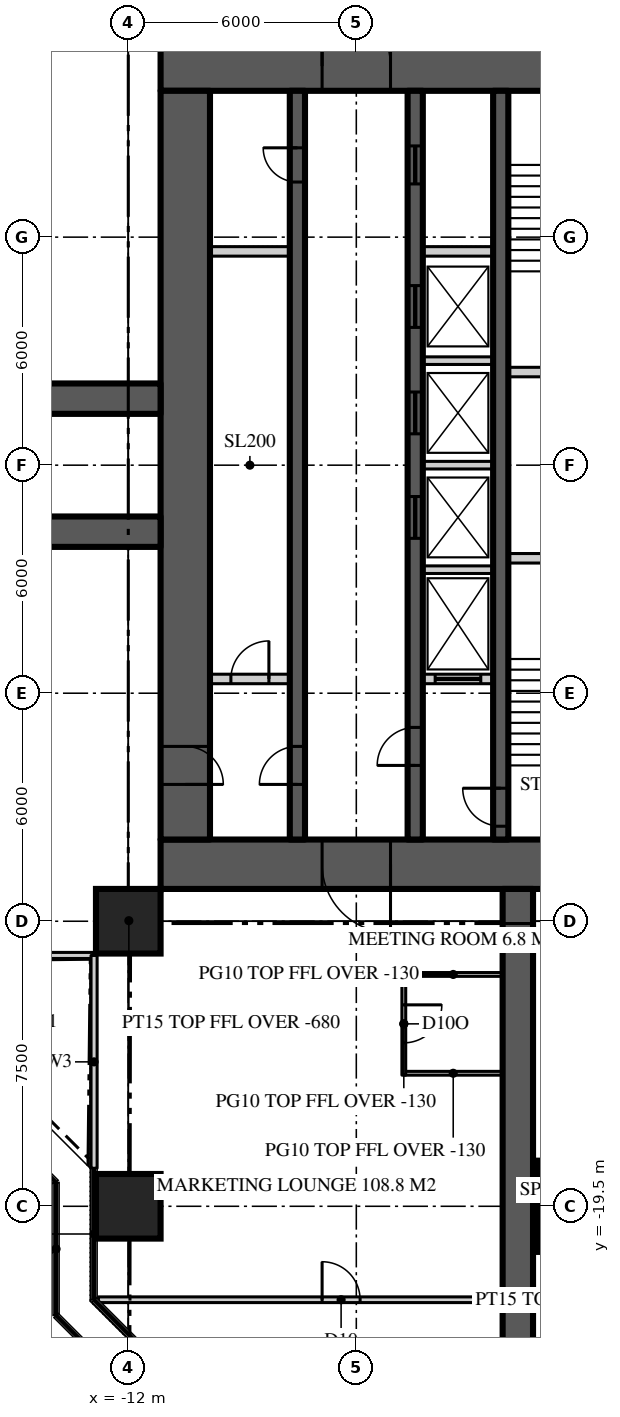
"""IFC4 building model, lengths in metres.
Left out: names, types, materials, properties, quantities, classifications, styles, units other than length and angle.
Written with IfcOpenShell. Run it as: python <this file> out.ifc"""

import sys

from ifc_helpers import new_model, si_unit, direction, frame, frame_2d, origin, origin_2d, place, context, subcontext, project, spatial, rectangle, extrude, element, fill, save


model = new_model("IFC4")
c1 = context("Model", 3, precision=1e-05, world=origin(), true_north=direction((0.0, 1.0)))
c2 = subcontext(c1, "Body", "Model", "MODEL_VIEW")
j1 = project(units=[si_unit("LENGTHUNIT", "METRE"), si_unit("PLANEANGLEUNIT", "RADIAN")], contexts=[c1])
p1 = place(None, origin())
s1 = spatial("IfcSite", under=j1, at=p1, CompositionType="ELEMENT")
p2 = place(p1, origin())
s2 = spatial("IfcBuilding", under=s1, at=p2, CompositionType="ELEMENT")
p3 = place(p2, frame((0.0, 0.0, 182.7)))
s3 = spatial("IfcBuildingStorey", under=s2, at=p3, CompositionType="ELEMENT", Elevation=182.7)
p4 = place(p3, frame((-11.15, 10.5, 0.0), z_axis=(0.0, 0.0, 1.0), x_axis=(1.0, 0.0, 0.0)))
e1 = element("IfcWall", 1, at=p4, inside=s3, PredefinedType="SHEAR", context=c2, shape_type="SweptSolid", body=[
    extrude(rectangle(XDim=22.3, YDim=1.3, at=frame_2d((11.15, 0.0))), origin(), (0.0, 0.0, 1.0), 3.9),
])
p5 = place(p4, frame((4.25, 0.0, 0.0)))
e2 = element("IfcOpeningElement", 2, at=p5, cuts=e1, PredefinedType="OPENING", context=c2, shape_type="SweptSolid", body=[
    extrude(rectangle(XDim=1.8, YDim=2.2, at=frame_2d((0.9, 1.1))), frame((0.0, 0.66, 0.0), z_axis=(0.0, -1.0, 0.0), x_axis=(1.0, 0.0, 0.0)), (0.0, 0.0, 1.0), 1.32),
])
p6 = place(p4, frame((16.25, 0.0, 0.0)))
e3 = element("IfcOpeningElement", 3, at=p6, cuts=e1, PredefinedType="OPENING", context=c2, shape_type="SweptSolid", body=[
    extrude(rectangle(XDim=1.8, YDim=2.2, at=frame_2d((0.9, 1.1))), frame((0.0, 0.66, 0.0), z_axis=(0.0, -1.0, 0.0), x_axis=(1.0, 0.0, 0.0)), (0.0, 0.0, 1.0), 1.32),
])
p7 = place(p3, frame((11.15, -10.5, 0.0), z_axis=(0.0, 0.0, 1.0), x_axis=(-1.0, 0.0, 0.0)))
e4 = element("IfcWall", 4, at=p7, inside=s3, PredefinedType="SHEAR", context=c2, shape_type="SweptSolid", body=[
    extrude(rectangle(XDim=22.3, YDim=1.3, at=frame_2d((11.15, 0.0))), origin(), (0.0, 0.0, 1.0), 3.9),
])
p8 = place(p7, frame((16.25, 0.0, 0.0)))
e5 = element("IfcOpeningElement", 5, at=p8, cuts=e4, PredefinedType="OPENING", context=c2, shape_type="SweptSolid", body=[
    extrude(rectangle(XDim=1.8, YDim=2.2, at=frame_2d((0.9, 1.1))), frame((0.0, 0.66, 0.0), z_axis=(0.0, -1.0, 0.0), x_axis=(1.0, 0.0, 0.0)), (0.0, 0.0, 1.0), 1.32),
])
p9 = place(p7, frame((4.25, 0.0, 0.0)))
e6 = element("IfcOpeningElement", 6, at=p9, cuts=e4, PredefinedType="OPENING", context=c2, shape_type="SweptSolid", body=[
    extrude(rectangle(XDim=1.8, YDim=2.2, at=frame_2d((0.9, 1.1))), frame((0.0, 0.66, 0.0), z_axis=(0.0, -1.0, 0.0), x_axis=(1.0, 0.0, 0.0)), (0.0, 0.0, 1.0), 1.32),
])
p10 = place(p3, frame((-10.5, 9.85, 0.0), z_axis=(0.0, 0.0, 1.0), x_axis=(0.0, -1.0, 0.0)))
e7 = element("IfcWall", 7, at=p10, inside=s3, PredefinedType="SHEAR", context=c2, shape_type="SweptSolid", body=[
    extrude(rectangle(XDim=19.7, YDim=1.3, at=frame_2d((9.85, 0.0))), origin(), (0.0, 0.0, 1.0), 3.9),
])
p11 = place(p10, frame((17.25, 0.0, 0.0)))
e8 = element("IfcOpeningElement", 8, at=p11, cuts=e7, PredefinedType="OPENING", context=c2, shape_type="SweptSolid", body=[
    extrude(rectangle(XDim=1.0, YDim=2.2, at=frame_2d((0.5, 1.1))), frame((0.0, 0.66, 0.0), z_axis=(0.0, -1.0, 0.0), x_axis=(1.0, 0.0, 0.0)), (0.0, 0.0, 1.0), 1.32),
])
for number, where, z_axis, x_axis in (
    (9, (-11.15, 1.75, 0.0), (0.0, 0.0, 1.0), (-1.0, 0.0, 0.0)),
    (10, (-11.15, -1.75, 0.0), (0.0, 0.0, 1.0), (-1.0, 0.0, 0.0)),
    (11, (-1.75, -11.15, 0.0), (0.0, 0.0, 1.0), (0.0, -1.0, 0.0)),
):
    element("IfcWall", number, at=place(p3, frame(where, z_axis=z_axis, x_axis=x_axis)), inside=s3, PredefinedType="SHEAR", context=c2, shape_type="SweptSolid", body=[
        extrude(rectangle(XDim=15.25, YDim=0.8, at=frame_2d((7.625, 0.0))), origin(), (0.0, 0.0, 1.0), 3.9),
    ])
p12 = place(p3, frame((-12.0, -19.5, 0.0), z_axis=(0.0, 0.0, 1.0), x_axis=(1.0, 0.0, 0.0)))
e12 = element("IfcColumn", 12, at=p12, inside=s3, PredefinedType="COLUMN", context=c2, shape_type="SweptSolid", body=[
    extrude(rectangle(XDim=1.7, YDim=1.7, at=origin_2d()), origin(), (0.0, 0.0, 1.0), 3.9),
])
p13 = place(p3, frame((0.0, -19.5, 0.0), z_axis=(0.0, 0.0, 1.0), x_axis=(1.0, 0.0, 0.0)))
e13 = element("IfcColumn", 13, at=p13, inside=s3, PredefinedType="COLUMN", context=c2, shape_type="SweptSolid", body=[
    extrude(rectangle(XDim=2.4, YDim=2.4, at=origin_2d()), origin(), (0.0, 0.0, 1.0), 3.9),
])
p14 = place(p3, frame((-12.0, -12.0, 0.0), z_axis=(0.0, 0.0, 1.0), x_axis=(1.0, 0.0, 0.0)))
e14 = element("IfcColumn", 14, at=p14, inside=s3, PredefinedType="COLUMN", context=c2, shape_type="SweptSolid", body=[
    extrude(rectangle(XDim=1.7, YDim=1.7, at=origin_2d()), origin(), (0.0, 0.0, 1.0), 3.9),
])
p15 = place(p3, frame((-18.5, -12.9, 0.0), z_axis=(0.0, 0.0, 1.0), x_axis=(1.0, 0.0, 0.0)))
e15 = element("IfcWall", 15, at=p15, inside=s3, PredefinedType="SOLIDWALL", context=c2, shape_type="SweptSolid", body=[
    extrude(rectangle(XDim=5.6, YDim=0.16, at=frame_2d((2.8, 0.0))), origin(), (0.0, 0.0, 1.0), 3.77),
])
p16 = place(p15, frame((2.3, 0.0, 0.0)))
e16 = element("IfcOpeningElement", 16, at=p16, cuts=e15, PredefinedType="OPENING", context=c2, shape_type="SweptSolid", body=[
    extrude(rectangle(XDim=1.0, YDim=2.2, at=frame_2d((0.5, 1.1))), frame((0.0, 0.09, 0.0), z_axis=(0.0, -1.0, 0.0), x_axis=(1.0, 0.0, 0.0)), (0.0, 0.0, 1.0), 0.18),
])
p17 = place(p3, frame((-12.9, -12.9, 0.0), z_axis=(0.0, 0.0, 1.0), x_axis=(0.0, -1.0, 0.0)))
e17 = element("IfcWall", 17, at=p17, inside=s3, PredefinedType="SOLIDWALL", context=c2, shape_type="SweptSolid", body=[
    extrude(rectangle(XDim=5.6, YDim=0.16, at=frame_2d((2.8, 0.0))), origin(), (0.0, 0.0, 1.0), 3.77),
])
p18 = place(p3, frame((-7.55, -9.85, 0.0), z_axis=(0.0, 0.0, 1.0), x_axis=(0.0, 1.0, 0.0)))
e18 = element("IfcWall", 18, at=p18, inside=s3, PredefinedType="SHEAR", context=c2, shape_type="SweptSolid", body=[
    extrude(rectangle(XDim=19.7, YDim=0.4, at=frame_2d((9.85, 0.0))), origin(), (0.0, 0.0, 1.0), 3.9),
])
p19 = place(p18, frame((1.45, 0.0, 0.0)))
e19 = element("IfcOpeningElement", 19, at=p19, cuts=e18, PredefinedType="OPENING", context=c2, shape_type="SweptSolid", body=[
    extrude(rectangle(XDim=1.0, YDim=2.2, at=frame_2d((0.5, 1.1))), frame((0.0, 0.21, 0.0), z_axis=(0.0, -1.0, 0.0), x_axis=(1.0, 0.0, 0.0)), (0.0, 0.0, 1.0), 0.42),
])
p20 = place(p18, frame((17.3, 0.0, 0.0)))
e20 = element("IfcOpeningElement", 20, at=p20, cuts=e18, PredefinedType="OPENING", context=c2, shape_type="SweptSolid", body=[
    extrude(rectangle(XDim=0.9, YDim=2.1, at=frame_2d((0.45, 1.05))), frame((0.0, 0.21, 0.0), z_axis=(0.0, -1.0, 0.0), x_axis=(1.0, 0.0, 0.0)), (0.0, 0.0, 1.0), 0.42),
])
p21 = place(p3, frame((-4.45, -9.85, 0.0), z_axis=(0.0, 0.0, 1.0), x_axis=(0.0, 1.0, 0.0)))
e21 = element("IfcWall", 21, at=p21, inside=s3, PredefinedType="SHEAR", context=c2, shape_type="SweptSolid", body=[
    extrude(rectangle(XDim=19.7, YDim=0.4, at=frame_2d((9.85, 0.0))), origin(), (0.0, 0.0, 1.0), 3.9),
])
p22 = place(p21, frame((1.95, 0.0, 0.0)))
e22 = element("IfcOpeningElement", 22, at=p22, cuts=e21, PredefinedType="OPENING", context=c2, shape_type="SweptSolid", body=[
    extrude(rectangle(XDim=1.0, YDim=2.2, at=frame_2d((0.5, 1.1))), frame((0.0, 0.21, 0.0), z_axis=(0.0, -1.0, 0.0), x_axis=(1.0, 0.0, 0.0)), (0.0, 0.0, 1.0), 0.42),
])
p23 = place(p21, frame((17.25, 0.0, 0.0)))
e23 = element("IfcOpeningElement", 23, at=p23, cuts=e21, PredefinedType="OPENING", context=c2, shape_type="SweptSolid", body=[
    extrude(rectangle(XDim=1.0, YDim=2.1, at=frame_2d((0.5, 1.05))), frame((0.0, 0.21, 0.0), z_axis=(0.0, -1.0, 0.0), x_axis=(1.0, 0.0, 0.0)), (0.0, 0.0, 1.0), 0.42),
])
p24 = place(p21, frame((7.925, 0.0, 0.0)))
e24 = element("IfcOpeningElement", 24, at=p24, cuts=e21, PredefinedType="OPENING", context=c2, shape_type="SweptSolid", body=[
    extrude(rectangle(XDim=1.1, YDim=2.2, at=frame_2d((0.55, 1.1))), frame((0.0, 0.21, 0.0), z_axis=(0.0, -1.0, 0.0), x_axis=(1.0, 0.0, 0.0)), (0.0, 0.0, 1.0), 0.42),
])
p25 = place(p21, frame((10.675, 0.0, 0.0)))
e25 = element("IfcOpeningElement", 25, at=p25, cuts=e21, PredefinedType="OPENING", context=c2, shape_type="SweptSolid", body=[
    extrude(rectangle(XDim=1.1, YDim=2.2, at=frame_2d((0.55, 1.1))), frame((0.0, 0.21, 0.0), z_axis=(0.0, -1.0, 0.0), x_axis=(1.0, 0.0, 0.0)), (0.0, 0.0, 1.0), 0.42),
])
p26 = place(p21, frame((13.475, 0.0, 0.0)))
e26 = element("IfcOpeningElement", 26, at=p26, cuts=e21, PredefinedType="OPENING", context=c2, shape_type="SweptSolid", body=[
    extrude(rectangle(XDim=1.1, YDim=2.2, at=frame_2d((0.55, 1.1))), frame((0.0, 0.21, 0.0), z_axis=(0.0, -1.0, 0.0), x_axis=(1.0, 0.0, 0.0)), (0.0, 0.0, 1.0), 0.42),
])
p27 = place(p3, frame((-2.2, -9.85, 0.0), z_axis=(0.0, 0.0, 1.0), x_axis=(0.0, 1.0, 0.0)))
e27 = element("IfcWall", 27, at=p27, inside=s3, PredefinedType="SHEAR", context=c2, shape_type="SweptSolid", body=[
    extrude(rectangle(XDim=19.7, YDim=0.4, at=frame_2d((9.85, 0.0))), origin(), (0.0, 0.0, 1.0), 3.9),
])
p28 = place(p27, frame((0.35, 0.0, 0.0)))
e28 = element("IfcOpeningElement", 28, at=p28, cuts=e27, PredefinedType="OPENING", context=c2, shape_type="SweptSolid", body=[
    extrude(rectangle(XDim=1.0, YDim=2.2, at=frame_2d((0.5, 1.1))), frame((0.0, 0.21, 0.0), z_axis=(0.0, -1.0, 0.0), x_axis=(1.0, 0.0, 0.0)), (0.0, 0.0, 1.0), 0.42),
])
p29 = place(p3, frame((-9.85, 5.625, 0.0), z_axis=(0.0, 0.0, 1.0), x_axis=(1.0, 0.0, 0.0)))
e29 = element("IfcWall", 29, at=p29, inside=s3, PredefinedType="SOLIDWALL", context=c2, shape_type="SweptSolid", body=[
    extrude(rectangle(XDim=2.1, YDim=0.25, at=frame_2d((1.05, 0.0))), origin(), (0.0, 0.0, 1.0), 3.7),
])
p30 = place(p3, frame((-4.25, 5.625, 0.0), z_axis=(0.0, 0.0, 1.0), x_axis=(1.0, 0.0, 0.0)))
e30 = element("IfcWall", 30, at=p30, inside=s3, PredefinedType="SOLIDWALL", context=c2, shape_type="SweptSolid", body=[
    extrude(rectangle(XDim=1.85, YDim=0.25, at=frame_2d((0.925, 0.0))), origin(), (0.0, 0.0, 1.0), 3.7),
])
p31 = place(p3, frame((-9.85, -5.625, 0.0), z_axis=(0.0, 0.0, 1.0), x_axis=(1.0, 0.0, 0.0)))
e31 = element("IfcWall", 31, at=p31, inside=s3, PredefinedType="SOLIDWALL", context=c2, shape_type="SweptSolid", body=[
    extrude(rectangle(XDim=2.1, YDim=0.25, at=frame_2d((1.05, 0.0))), origin(), (0.0, 0.0, 1.0), 3.7),
])
p32 = place(p31, frame((0.55, 0.0, 0.0)))
e32 = element("IfcOpeningElement", 32, at=p32, cuts=e31, PredefinedType="OPENING", context=c2, shape_type="SweptSolid", body=[
    extrude(rectangle(XDim=1.0, YDim=2.2, at=frame_2d((0.5, 1.1))), frame((0.0, 0.135, 0.0), z_axis=(0.0, -1.0, 0.0), x_axis=(1.0, 0.0, 0.0)), (0.0, 0.0, 1.0), 0.27),
])
p33 = place(p3, frame((-4.25, -5.625, 0.0), z_axis=(0.0, 0.0, 1.0), x_axis=(1.0, 0.0, 0.0)))
e33 = element("IfcWall", 33, at=p33, inside=s3, PredefinedType="SOLIDWALL", context=c2, shape_type="SweptSolid", body=[
    extrude(rectangle(XDim=1.85, YDim=0.25, at=frame_2d((0.925, 0.0))), origin(), (0.0, 0.0, 1.0), 3.7),
])
p34 = place(p33, frame((0.325, 0.0, 0.0)))
e34 = element("IfcOpeningElement", 34, at=p34, cuts=e33, PredefinedType="OPENING", context=c2, shape_type="SweptSolid", body=[
    extrude(rectangle(XDim=1.2, YDim=2.2, at=frame_2d((0.6, 1.1))), frame((0.0, 0.135, 0.0), z_axis=(0.0, -1.0, 0.0), x_axis=(1.0, 0.0, 0.0)), (0.0, 0.0, 1.0), 0.27),
])
for number, where, z_axis, x_axis in (
    (35, (-2.0, -2.45, 0.0), (0.0, 0.0, 1.0), (1.0, 0.0, 0.0)),
    (36, (-2.0, 2.45, 0.0), (0.0, 0.0, 1.0), (1.0, 0.0, 0.0)),
):
    element("IfcWall", number, at=place(p3, frame(where, z_axis=z_axis, x_axis=x_axis)), inside=s3, PredefinedType="SOLIDWALL", context=c2, shape_type="SweptSolid", body=[
        extrude(rectangle(XDim=4.0, YDim=0.25, at=frame_2d((2.0, 0.0))), origin(), (0.0, 0.0, 1.0), 3.7),
    ])
for number, where, z_axis, x_axis in (
    (37, (-4.25, -2.75, 0.0), (0.0, 0.0, 1.0), (1.0, 0.0, 0.0)),
    (38, (-4.25, 0.0, 0.0), (0.0, 0.0, 1.0), (1.0, 0.0, 0.0)),
    (39, (-4.25, 2.75, 0.0), (0.0, 0.0, 1.0), (1.0, 0.0, 0.0)),
):
    element("IfcWall", number, at=place(p3, frame(where, z_axis=z_axis, x_axis=x_axis)), inside=s3, PredefinedType="SOLIDWALL", context=c2, shape_type="SweptSolid", body=[
        extrude(rectangle(XDim=1.85, YDim=0.2, at=frame_2d((0.925, 0.0))), origin(), (0.0, 0.0, 1.0), 3.7),
    ])
p35 = place(p3, frame((-12.786, -21.959, 0.0), z_axis=(0.0, 0.0, 1.0), x_axis=(1.0, 0.0, 0.0)))
e40 = element("IfcWall", 40, at=p35, inside=s3, PredefinedType="PARTITIONING", context=c2, shape_type="SweptSolid", body=[
    extrude(rectangle(XDim=25.573, YDim=0.15, at=frame_2d((12.786, 0.0))), origin(), (0.0, 0.0, 1.0), 3.77),
])
p36 = place(p35, frame((18.687, 0.0, 0.0)))
e41 = element("IfcOpeningElement", 41, at=p36, cuts=e40, PredefinedType="OPENING", context=c2, shape_type="SweptSolid", body=[
    extrude(rectangle(XDim=1.0, YDim=2.2, at=frame_2d((0.5, 1.1))), frame((0.0, 0.085, 0.0), z_axis=(0.0, -1.0, 0.0), x_axis=(1.0, 0.0, 0.0)), (0.0, 0.0, 1.0), 0.17),
])
p37 = place(p35, frame((5.886, 0.0, 0.0)))
e42 = element("IfcOpeningElement", 42, at=p37, cuts=e40, PredefinedType="OPENING", context=c2, shape_type="SweptSolid", body=[
    extrude(rectangle(XDim=1.0, YDim=2.2, at=frame_2d((0.5, 1.1))), frame((0.0, 0.085, 0.0), z_axis=(0.0, -1.0, 0.0), x_axis=(1.0, 0.0, 0.0)), (0.0, 0.0, 1.0), 0.17),
])
for number, where, z_axis, x_axis in (
    (43, (-2.15, -13.4, 0.0), (0.0, 0.0, 1.0), (-1.0, 0.0, 0.0)),
    (44, (-2.15, -16.0, 0.0), (0.0, 0.0, 1.0), (-1.0, 0.0, 0.0)),
):
    element("IfcWall", number, at=place(p3, frame(where, z_axis=z_axis, x_axis=x_axis)), inside=s3, PredefinedType="PARTITIONING", context=c2, shape_type="SweptSolid", body=[
        extrude(rectangle(XDim=2.6, YDim=0.1, at=frame_2d((1.3, 0.0))), origin(), (0.0, 0.0, 1.0), 3.77),
    ])
p38 = place(p3, frame((-4.75, -13.35, 0.0), z_axis=(0.0, 0.0, 1.0), x_axis=(0.0, -1.0, 0.0)))
e45 = element("IfcWall", 45, at=p38, inside=s3, PredefinedType="PARTITIONING", context=c2, shape_type="SweptSolid", body=[
    extrude(rectangle(XDim=2.7, YDim=0.1, at=frame_2d((1.35, 0.0))), origin(), (0.0, 0.0, 1.0), 3.77),
])
p39 = place(p38, frame((0.85, 0.0, 0.0)))
e46 = element("IfcOpeningElement", 46, at=p39, cuts=e45, PredefinedType="OPENING", context=c2, shape_type="SweptSolid", body=[
    extrude(rectangle(XDim=1.0, YDim=2.2, at=frame_2d((0.5, 1.1))), frame((0.0, 0.06, 0.0), z_axis=(0.0, -1.0, 0.0), x_axis=(1.0, 0.0, 0.0)), (0.0, 0.0, 1.0), 0.12),
])
p40 = place(p3, frame((-11.15, -11.15, 0.0), z_axis=(0.0, 0.0, 1.0), x_axis=(-0.707106781187, -0.707106781187, 0.0)))
e47 = element("IfcWall", 47, at=p40, inside=s3, PredefinedType="PARTITIONING", context=c2, shape_type="SweptSolid", body=[
    extrude(rectangle(XDim=2.362, YDim=0.15, at=frame_2d((1.181, 0.0))), origin(), (0.0, 0.0, 1.0), 3.22),
])
p41 = place(p5, origin())
e48 = element("IfcDoor", 48, at=p41, inside=s3, OperationType="DOUBLE_DOOR_DOUBLE_SWING", PredefinedType="DOOR", context=c2, shape_type="SweptSolid", body=[
    extrude(rectangle(XDim=1.8, YDim=2.2, at=frame_2d((0.9, 1.1))), frame((0.0, 0.025, 0.0), z_axis=(0.0, -1.0, 0.0), x_axis=(1.0, 0.0, 0.0)), (0.0, 0.0, 1.0), 0.05),
])
fill(e2, e48)
p42 = place(p8, origin())
e49 = element("IfcDoor", 49, at=p42, inside=s3, OperationType="DOUBLE_DOOR_DOUBLE_SWING", PredefinedType="DOOR", context=c2, shape_type="SweptSolid", body=[
    extrude(rectangle(XDim=1.8, YDim=2.2, at=frame_2d((0.9, 1.1))), frame((0.0, 0.025, 0.0), z_axis=(0.0, -1.0, 0.0), x_axis=(1.0, 0.0, 0.0)), (0.0, 0.0, 1.0), 0.05),
])
fill(e5, e49)
p43 = place(p19, origin())
e50 = element("IfcDoor", 50, at=p43, inside=s3, OperationType="SINGLE_SWING_LEFT", PredefinedType="DOOR", context=c2, shape_type="SweptSolid", body=[
    extrude(rectangle(XDim=1.0, YDim=2.2, at=frame_2d((0.5, 1.1))), frame((0.0, 0.025, 0.0), z_axis=(0.0, -1.0, 0.0), x_axis=(1.0, 0.0, 0.0)), (0.0, 0.0, 1.0), 0.05),
])
fill(e19, e50)
p44 = place(p11, origin())
e51 = element("IfcDoor", 51, at=p44, inside=s3, OperationType="SINGLE_SWING_RIGHT", PredefinedType="DOOR", context=c2, shape_type="SweptSolid", body=[
    extrude(rectangle(XDim=1.0, YDim=2.2, at=frame_2d((0.5, 1.1))), frame((0.0, 0.025, 0.0), z_axis=(0.0, -1.0, 0.0), x_axis=(1.0, 0.0, 0.0)), (0.0, 0.0, 1.0), 0.05),
])
fill(e8, e51)
p45 = place(p22, origin())
e52 = element("IfcDoor", 52, at=p45, inside=s3, OperationType="SINGLE_SWING_LEFT", PredefinedType="DOOR", context=c2, shape_type="SweptSolid", body=[
    extrude(rectangle(XDim=1.0, YDim=2.2, at=frame_2d((0.5, 1.1))), frame((0.0, 0.025, 0.0), z_axis=(0.0, -1.0, 0.0), x_axis=(1.0, 0.0, 0.0)), (0.0, 0.0, 1.0), 0.05),
])
fill(e22, e52)
p46 = place(p28, origin())
e53 = element("IfcDoor", 53, at=p46, inside=s3, OperationType="SINGLE_SWING_RIGHT", PredefinedType="DOOR", context=c2, shape_type="SweptSolid", body=[
    extrude(rectangle(XDim=1.0, YDim=2.2, at=frame_2d((0.5, 1.1))), frame((0.0, 0.025, 0.0), z_axis=(0.0, -1.0, 0.0), x_axis=(1.0, 0.0, 0.0)), (0.0, 0.0, 1.0), 0.05),
])
fill(e28, e53)
p47 = place(p20, origin())
e54 = element("IfcDoor", 54, at=p47, inside=s3, OperationType="SINGLE_SWING_RIGHT", PredefinedType="DOOR", context=c2, shape_type="SweptSolid", body=[
    extrude(rectangle(XDim=0.9, YDim=2.1, at=frame_2d((0.45, 1.05))), frame((0.0, 0.025, 0.0), z_axis=(0.0, -1.0, 0.0), x_axis=(1.0, 0.0, 0.0)), (0.0, 0.0, 1.0), 0.05),
])
fill(e20, e54)
p48 = place(p23, origin())
e55 = element("IfcDoor", 55, at=p48, inside=s3, OperationType="SLIDING_TO_LEFT", PredefinedType="DOOR", context=c2, shape_type="SweptSolid", body=[
    extrude(rectangle(XDim=1.0, YDim=2.1, at=frame_2d((0.5, 1.05))), frame((0.0, 0.025, 0.0), z_axis=(0.0, -1.0, 0.0), x_axis=(1.0, 0.0, 0.0)), (0.0, 0.0, 1.0), 0.05),
])
fill(e23, e55)
p49 = place(p24, origin())
e56 = element("IfcDoor", 56, at=p49, inside=s3, OperationType="SLIDING_TO_LEFT", PredefinedType="DOOR", context=c2, shape_type="SweptSolid", body=[
    extrude(rectangle(XDim=1.1, YDim=2.2, at=frame_2d((0.55, 1.1))), frame((0.0, 0.025, 0.0), z_axis=(0.0, -1.0, 0.0), x_axis=(1.0, 0.0, 0.0)), (0.0, 0.0, 1.0), 0.05),
])
fill(e24, e56)
p50 = place(p25, origin())
e57 = element("IfcDoor", 57, at=p50, inside=s3, OperationType="SLIDING_TO_LEFT", PredefinedType="DOOR", context=c2, shape_type="SweptSolid", body=[
    extrude(rectangle(XDim=1.1, YDim=2.2, at=frame_2d((0.55, 1.1))), frame((0.0, 0.025, 0.0), z_axis=(0.0, -1.0, 0.0), x_axis=(1.0, 0.0, 0.0)), (0.0, 0.0, 1.0), 0.05),
])
fill(e25, e57)
p51 = place(p26, origin())
e58 = element("IfcDoor", 58, at=p51, inside=s3, OperationType="SLIDING_TO_LEFT", PredefinedType="DOOR", context=c2, shape_type="SweptSolid", body=[
    extrude(rectangle(XDim=1.1, YDim=2.2, at=frame_2d((0.55, 1.1))), frame((0.0, 0.025, 0.0), z_axis=(0.0, -1.0, 0.0), x_axis=(1.0, 0.0, 0.0)), (0.0, 0.0, 1.0), 0.05),
])
fill(e26, e58)
p52 = place(p34, origin())
e59 = element("IfcDoor", 59, at=p52, inside=s3, OperationType="SLIDING_TO_LEFT", PredefinedType="DOOR", context=c2, shape_type="SweptSolid", body=[
    extrude(rectangle(XDim=1.2, YDim=2.2, at=frame_2d((0.6, 1.1))), frame((0.0, 0.025, 0.0), z_axis=(0.0, -1.0, 0.0), x_axis=(1.0, 0.0, 0.0)), (0.0, 0.0, 1.0), 0.05),
])
fill(e34, e59)
p53 = place(p37, origin())
e60 = element("IfcDoor", 60, at=p53, inside=s3, OperationType="SINGLE_SWING_LEFT", PredefinedType="DOOR", context=c2, shape_type="SweptSolid", body=[
    extrude(rectangle(XDim=1.0, YDim=2.2, at=frame_2d((0.5, 1.1))), frame((0.0, 0.025, 0.0), z_axis=(0.0, -1.0, 0.0), x_axis=(1.0, 0.0, 0.0)), (0.0, 0.0, 1.0), 0.05),
])
fill(e42, e60)
p54 = place(p39, origin())
e61 = element("IfcDoor", 61, at=p54, inside=s3, OperationType="SINGLE_SWING_LEFT", PredefinedType="DOOR", context=c2, shape_type="SweptSolid", body=[
    extrude(rectangle(XDim=1.0, YDim=2.2, at=frame_2d((0.5, 1.1))), frame((0.0, 0.025, 0.0), z_axis=(0.0, -1.0, 0.0), x_axis=(1.0, 0.0, 0.0)), (0.0, 0.0, 1.0), 0.05),
])
fill(e46, e61)
p55 = place(p32, origin())
e62 = element("IfcDoor", 62, at=p55, inside=s3, OperationType="SINGLE_SWING_RIGHT", PredefinedType="DOOR", context=c2, shape_type="SweptSolid", body=[
    extrude(rectangle(XDim=1.0, YDim=2.2, at=frame_2d((0.5, 1.1))), frame((0.0, 0.025, 0.0), z_axis=(0.0, -1.0, 0.0), x_axis=(1.0, 0.0, 0.0)), (0.0, 0.0, 1.0), 0.05),
])
fill(e32, e62)
save(model, sys.argv[1])
